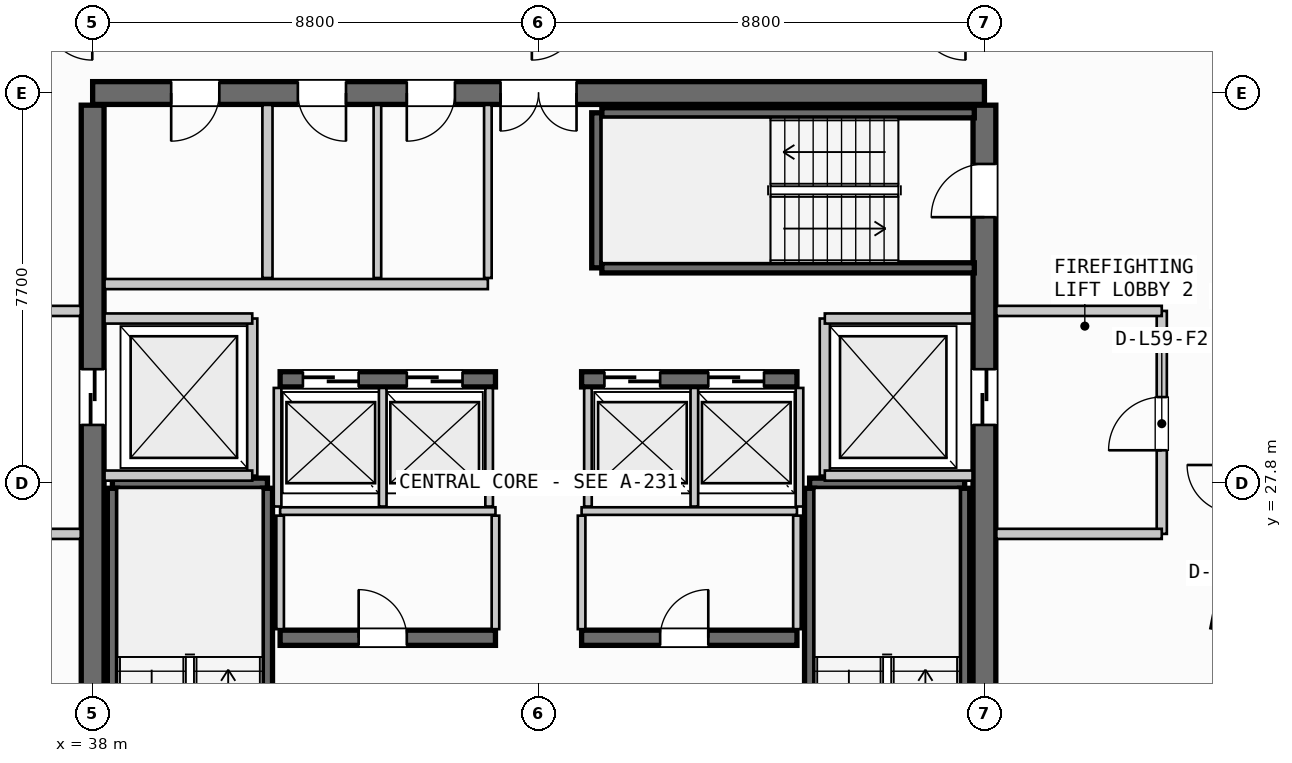
"""IFC4 building model, lengths in metres.
Left out: names, types, materials, properties, quantities, classifications, styles, units other than length and angle.
Written with IfcOpenShell. Run it as: python <this file> out.ifc"""

import sys

from ifc_helpers import new_model, si_unit, direction, frame, frame_2d, origin, origin_2d, place, context, subcontext, project, spatial, rectangle, i_section, extrude, source, transform, mapped, element, fill, save


model = new_model("IFC4")
c1 = context("Model", 3, precision=1e-05, world=origin(), true_north=direction((0.0, 1.0)))
c2 = subcontext(c1, "Body", "Model", "MODEL_VIEW")
j1 = project(units=[si_unit("LENGTHUNIT", "METRE"), si_unit("PLANEANGLEUNIT", "RADIAN")], contexts=[c1])
p1 = place(None, origin())
s1 = spatial("IfcSite", under=j1, at=p1, CompositionType="ELEMENT")
p2 = place(p1, origin())
s2 = spatial("IfcBuilding", under=s1, at=p2, CompositionType="ELEMENT")
p3 = place(p2, frame((0.0, 0.0, 228.4)))
s3 = spatial("IfcBuildingStorey", under=s2, at=p3, CompositionType="ELEMENT", Elevation=228.4)
p4 = place(p3, frame((55.6, 35.5, 0.0), z_axis=(0.0, 0.0, 1.0), x_axis=(-1.0, 0.0, 0.0)))
e1 = element("IfcWall", 1, at=p4, inside=s3, PredefinedType="SHEAR", context=c2, shape_type="SweptSolid", body=[
    extrude(rectangle(XDim=17.6, YDim=0.45, at=frame_2d((8.8, 0.0))), origin(), (0.0, 0.0, 1.0), 3.21),
])
p5 = place(p4, frame((8.05, 0.0, 0.0)))
e2 = element("IfcOpeningElement", 2, at=p5, cuts=e1, PredefinedType="OPENING", context=c2, shape_type="SweptSolid", body=[
    extrude(rectangle(XDim=1.5, YDim=2.2, at=frame_2d((0.75, 1.1))), frame((0.0, 0.235, 0.0), z_axis=(0.0, -1.0, 0.0), x_axis=(1.0, 0.0, 0.0)), (0.0, 0.0, 1.0), 0.47),
])
p6 = place(p4, frame((15.1, 0.0, 0.0)))
e3 = element("IfcOpeningElement", 3, at=p6, cuts=e1, PredefinedType="OPENING", context=c2, shape_type="SweptSolid", body=[
    extrude(rectangle(XDim=0.95, YDim=2.15, at=frame_2d((0.475, 1.075))), frame((0.0, 0.235, 0.0), z_axis=(0.0, -1.0, 0.0), x_axis=(1.0, 0.0, 0.0)), (0.0, 0.0, 1.0), 0.47),
])
p7 = place(p4, frame((12.6, 0.0, 0.0)))
e4 = element("IfcOpeningElement", 4, at=p7, cuts=e1, PredefinedType="OPENING", context=c2, shape_type="SweptSolid", body=[
    extrude(rectangle(XDim=0.95, YDim=2.15, at=frame_2d((0.475, 1.075))), frame((0.0, 0.235, 0.0), z_axis=(0.0, -1.0, 0.0), x_axis=(1.0, 0.0, 0.0)), (0.0, 0.0, 1.0), 0.47),
])
p8 = place(p4, frame((10.45, 0.0, 0.0)))
e5 = element("IfcOpeningElement", 5, at=p8, cuts=e1, PredefinedType="OPENING", context=c2, shape_type="SweptSolid", body=[
    extrude(rectangle(XDim=0.95, YDim=2.15, at=frame_2d((0.475, 1.075))), frame((0.0, 0.235, 0.0), z_axis=(0.0, -1.0, 0.0), x_axis=(1.0, 0.0, 0.0)), (0.0, 0.0, 1.0), 0.47),
])
p9 = place(p3, frame((38.0, 35.26, 0.0), z_axis=(0.0, 0.0, 1.0), x_axis=(0.0, -1.0, 0.0)))
e6 = element("IfcWall", 6, at=p9, inside=s3, PredefinedType="SHEAR", context=c2, shape_type="SweptSolid", body=[
    extrude(rectangle(XDim=14.92, YDim=0.45, at=frame_2d((7.46, 0.0))), origin(), (0.0, 0.0, 1.0), 3.21),
])
p10 = place(p9, frame((5.21, 0.0, 0.0)))
e7 = element("IfcOpeningElement", 7, at=p10, cuts=e6, PredefinedType="OPENING", context=c2, shape_type="SweptSolid", body=[
    extrude(rectangle(XDim=1.1, YDim=2.2, at=frame_2d((0.55, 1.1))), frame((0.0, 0.235, 0.0), z_axis=(0.0, -1.0, 0.0), x_axis=(1.0, 0.0, 0.0)), (0.0, 0.0, 1.0), 0.47),
])
p11 = place(p3, frame((55.6, 20.34, 0.0), z_axis=(0.0, 0.0, 1.0), x_axis=(0.0, 1.0, 0.0)))
e8 = element("IfcWall", 8, at=p11, inside=s3, PredefinedType="SHEAR", context=c2, shape_type="SweptSolid", body=[
    extrude(rectangle(XDim=14.92, YDim=0.45, at=frame_2d((7.46, 0.0))), origin(), (0.0, 0.0, 1.0), 3.21),
])
p12 = place(p11, frame((12.71, 0.0, 0.0)))
e9 = element("IfcOpeningElement", 9, at=p12, cuts=e8, PredefinedType="OPENING", context=c2, shape_type="SweptSolid", body=[
    extrude(rectangle(XDim=1.05, YDim=2.15, at=frame_2d((0.525, 1.075))), frame((0.0, 0.235, 0.0), z_axis=(0.0, -1.0, 0.0), x_axis=(1.0, 0.0, 0.0)), (0.0, 0.0, 1.0), 0.47),
])
p13 = place(p11, frame((8.61, 0.0, 0.0)))
e10 = element("IfcOpeningElement", 10, at=p13, cuts=e8, PredefinedType="OPENING", context=c2, shape_type="SweptSolid", body=[
    extrude(rectangle(XDim=1.1, YDim=2.2, at=frame_2d((0.55, 1.1))), frame((0.0, 0.235, 0.0), z_axis=(0.0, -1.0, 0.0), x_axis=(1.0, 0.0, 0.0)), (0.0, 0.0, 1.0), 0.47),
])
p14 = place(p3, frame((41.7, 24.75, 0.0), z_axis=(0.0, 0.0, 1.0), x_axis=(1.0, 0.0, 0.0)))
e11 = element("IfcWall", 11, at=p14, inside=s3, PredefinedType="SHEAR", context=c2, shape_type="SweptSolid", body=[
    extrude(rectangle(XDim=4.25, YDim=0.3, at=frame_2d((2.125, 0.0))), origin(), (0.0, 0.0, 1.0), 3.21),
])
p15 = place(p14, frame((1.55, 0.0, 0.0)))
e12 = element("IfcOpeningElement", 12, at=p15, cuts=e11, PredefinedType="OPENING", context=c2, shape_type="SweptSolid", body=[
    extrude(rectangle(XDim=0.95, YDim=2.15, at=frame_2d((0.475, 1.075))), frame((0.0, 0.16, 0.0), z_axis=(0.0, -1.0, 0.0), x_axis=(1.0, 0.0, 0.0)), (0.0, 0.0, 1.0), 0.32),
])
p16 = place(p3, frame((47.65, 24.75, 0.0), z_axis=(0.0, 0.0, 1.0), x_axis=(1.0, 0.0, 0.0)))
e13 = element("IfcWall", 13, at=p16, inside=s3, PredefinedType="SHEAR", context=c2, shape_type="SweptSolid", body=[
    extrude(rectangle(XDim=4.25, YDim=0.3, at=frame_2d((2.125, 0.0))), origin(), (0.0, 0.0, 1.0), 3.21),
])
p17 = place(p16, frame((1.55, 0.0, 0.0)))
e14 = element("IfcOpeningElement", 14, at=p17, cuts=e13, PredefinedType="OPENING", context=c2, shape_type="SweptSolid", body=[
    extrude(rectangle(XDim=0.95, YDim=2.15, at=frame_2d((0.475, 1.075))), frame((0.0, 0.16, 0.0), z_axis=(0.0, -1.0, 0.0), x_axis=(1.0, 0.0, 0.0)), (0.0, 0.0, 1.0), 0.32),
])
p18 = place(p3, frame((41.7, 29.85, 0.0), z_axis=(0.0, 0.0, 1.0), x_axis=(1.0, 0.0, 0.0)))
e15 = element("IfcWall", 15, at=p18, inside=s3, PredefinedType="SHEAR", context=c2, shape_type="SweptSolid", body=[
    extrude(rectangle(XDim=4.25, YDim=0.3, at=frame_2d((2.125, 0.0))), origin(), (0.0, 0.0, 1.0), 3.21),
])
p19 = place(p18, frame((0.45, 0.0, 0.0)))
e16 = element("IfcOpeningElement", 16, at=p19, cuts=e15, PredefinedType="OPENING", context=c2, shape_type="SweptSolid", body=[
    extrude(rectangle(XDim=1.1, YDim=2.2, at=frame_2d((0.55, 1.1))), frame((0.0, 0.16, 0.0), z_axis=(0.0, -1.0, 0.0), x_axis=(1.0, 0.0, 0.0)), (0.0, 0.0, 1.0), 0.32),
])
p20 = place(p18, frame((2.5, 0.0, 0.0)))
e17 = element("IfcOpeningElement", 17, at=p20, cuts=e15, PredefinedType="OPENING", context=c2, shape_type="SweptSolid", body=[
    extrude(rectangle(XDim=1.1, YDim=2.2, at=frame_2d((0.55, 1.1))), frame((0.0, 0.16, 0.0), z_axis=(0.0, -1.0, 0.0), x_axis=(1.0, 0.0, 0.0)), (0.0, 0.0, 1.0), 0.32),
])
p21 = place(p3, frame((47.65, 29.85, 0.0), z_axis=(0.0, 0.0, 1.0), x_axis=(1.0, 0.0, 0.0)))
e18 = element("IfcWall", 18, at=p21, inside=s3, PredefinedType="SHEAR", context=c2, shape_type="SweptSolid", body=[
    extrude(rectangle(XDim=4.25, YDim=0.3, at=frame_2d((2.125, 0.0))), origin(), (0.0, 0.0, 1.0), 3.21),
])
p22 = place(p21, frame((0.45, 0.0, 0.0)))
e19 = element("IfcOpeningElement", 19, at=p22, cuts=e18, PredefinedType="OPENING", context=c2, shape_type="SweptSolid", body=[
    extrude(rectangle(XDim=1.1, YDim=2.2, at=frame_2d((0.55, 1.1))), frame((0.0, 0.16, 0.0), z_axis=(0.0, -1.0, 0.0), x_axis=(1.0, 0.0, 0.0)), (0.0, 0.0, 1.0), 0.32),
])
p23 = place(p21, frame((2.5, 0.0, 0.0)))
e20 = element("IfcOpeningElement", 20, at=p23, cuts=e18, PredefinedType="OPENING", context=c2, shape_type="SweptSolid", body=[
    extrude(rectangle(XDim=1.1, YDim=2.2, at=frame_2d((0.55, 1.1))), frame((0.0, 0.16, 0.0), z_axis=(0.0, -1.0, 0.0), x_axis=(1.0, 0.0, 0.0)), (0.0, 0.0, 1.0), 0.32),
])
m1 = source(origin(), c2, "Body", "SweptSolid", [
    extrude(i_section(OverallWidth=0.387, OverallDepth=0.316, WebThickness=0.019, FlangeThickness=0.028, FilletRadius=0.015, at=origin_2d()), origin(), (0.0, 0.0, 1.0), 3.21),
])
p24 = place(p3, frame((60.284, 25.118, 0.0), z_axis=(0.0, 0.0, 1.0), x_axis=(0.980785280403, -0.195090322016, 0.0)))
e21 = element("IfcColumn", 21, at=p24, inside=s3, PredefinedType="COLUMN", context=c2, shape_type="MappedRepresentation", body=[
    mapped(m1, transform((0.0, 0.0, 0.0), scale=1.0)),
])
p25 = place(p3, frame((38.39, 27.8, 0.0), z_axis=(0.0, 0.0, 1.0), x_axis=(1.0, 0.0, 0.0)))
e22 = element("IfcWall", 22, at=p25, inside=s3, PredefinedType="SHEAR", context=c2, shape_type="SweptSolid", body=[
    extrude(rectangle(XDim=3.06, YDim=0.2, at=frame_2d((1.53, 0.0))), origin(), (0.0, 0.0, 1.0), 3.21),
])
for number, where, z_axis, x_axis in (
    (23, (41.45, 27.7, 0.0), (0.0, 0.0, 1.0), (0.0, -1.0, 0.0)),
    (24, (38.39, 20.35, 0.0), (0.0, 0.0, 1.0), (0.0, 1.0, 0.0)),
):
    element("IfcWall", number, at=place(p3, frame(where, z_axis=z_axis, x_axis=x_axis)), inside=s3, PredefinedType="SHEAR", context=c2, shape_type="SweptSolid", body=[
        extrude(rectangle(XDim=7.35, YDim=0.2, at=frame_2d((3.675, 0.0))), origin(), (0.0, 0.0, 1.0), 3.21),
    ])
p26 = place(p3, frame((52.15, 27.8, 0.0), z_axis=(0.0, 0.0, 1.0), x_axis=(1.0, 0.0, 0.0)))
e25 = element("IfcWall", 25, at=p26, inside=s3, PredefinedType="SHEAR", context=c2, shape_type="SweptSolid", body=[
    extrude(rectangle(XDim=3.06, YDim=0.2, at=frame_2d((1.53, 0.0))), origin(), (0.0, 0.0, 1.0), 3.21),
])
for number, where, z_axis, x_axis in (
    (26, (55.21, 27.7, 0.0), (0.0, 0.0, 1.0), (0.0, -1.0, 0.0)),
    (27, (52.15, 20.35, 0.0), (0.0, 0.0, 1.0), (0.0, 1.0, 0.0)),
):
    element("IfcWall", number, at=place(p3, frame(where, z_axis=z_axis, x_axis=x_axis)), inside=s3, PredefinedType="SHEAR", context=c2, shape_type="SweptSolid", body=[
        extrude(rectangle(XDim=7.35, YDim=0.2, at=frame_2d((3.675, 0.0))), origin(), (0.0, 0.0, 1.0), 3.21),
    ])
p27 = place(p3, frame((47.95, 32.05, 0.0), z_axis=(0.0, 0.0, 1.0), x_axis=(0.0, 1.0, 0.0)))
e28 = element("IfcWall", 28, at=p27, inside=s3, PredefinedType="SHEAR", context=c2, shape_type="SweptSolid", body=[
    extrude(rectangle(XDim=3.06, YDim=0.2, at=frame_2d((1.53, 0.0))), origin(), (0.0, 0.0, 1.0), 3.21),
])
for number, where, z_axis, x_axis in (
    (29, (48.05, 35.11, 0.0), (0.0, 0.0, 1.0), (1.0, 0.0, 0.0)),
    (30, (55.4, 32.05, 0.0), (0.0, 0.0, 1.0), (-1.0, 0.0, 0.0)),
):
    element("IfcWall", number, at=place(p3, frame(where, z_axis=z_axis, x_axis=x_axis)), inside=s3, PredefinedType="SHEAR", context=c2, shape_type="SweptSolid", body=[
        extrude(rectangle(XDim=7.35, YDim=0.2, at=frame_2d((3.675, 0.0))), origin(), (0.0, 0.0, 1.0), 3.21),
    ])
p28 = place(p3, frame((41.15, 27.95, 0.0), z_axis=(0.0, 0.0, 1.0), x_axis=(0.0, 1.0, 0.0)))
e31 = element("IfcWall", 31, at=p28, inside=s3, PredefinedType="PARTITIONING", context=c2, shape_type="SweptSolid", body=[
    extrude(rectangle(XDim=3.1, YDim=0.2, at=frame_2d((1.55, 0.0))), origin(), (0.0, 0.0, 1.0), 2.28),
])
for number, where, z_axis, x_axis in (
    (32, (38.235, 27.95, 0.0), (0.0, 0.0, 1.0), (1.0, 0.0, 0.0)),
    (33, (38.235, 31.05, 0.0), (0.0, 0.0, 1.0), (1.0, 0.0, 0.0)),
):
    element("IfcWall", number, at=place(p3, frame(where, z_axis=z_axis, x_axis=x_axis)), inside=s3, PredefinedType="PARTITIONING", context=c2, shape_type="SweptSolid", body=[
        extrude(rectangle(XDim=2.915, YDim=0.2, at=frame_2d((1.458, 0.0))), origin(), (0.0, 0.0, 1.0), 2.28),
    ])
for number, where, z_axis, x_axis in (
    (34, (34.5, 26.8, 0.0), (0.0, 0.0, 1.0), (1.0, 0.0, 0.0)),
    (35, (34.5, 31.2, 0.0), (0.0, 0.0, 1.0), (1.0, 0.0, 0.0)),
):
    element("IfcWall", number, at=place(p3, frame(where, z_axis=z_axis, x_axis=x_axis)), inside=s3, PredefinedType="PARTITIONING", context=c2, shape_type="SweptSolid", body=[
        extrude(rectangle(XDim=3.265, YDim=0.2, at=frame_2d((1.632, 0.0))), origin(), (0.0, 0.0, 1.0), 2.28),
    ])
p29 = place(p3, frame((52.45, 27.95, 0.0), z_axis=(0.0, 0.0, 1.0), x_axis=(0.0, 1.0, 0.0)))
e36 = element("IfcWall", 36, at=p29, inside=s3, PredefinedType="PARTITIONING", context=c2, shape_type="SweptSolid", body=[
    extrude(rectangle(XDim=3.1, YDim=0.2, at=frame_2d((1.55, 0.0))), origin(), (0.0, 0.0, 1.0), 2.28),
])
for number, where, z_axis, x_axis in (
    (37, (52.45, 27.95, 0.0), (0.0, 0.0, 1.0), (1.0, 0.0, 0.0)),
    (38, (52.45, 31.05, 0.0), (0.0, 0.0, 1.0), (1.0, 0.0, 0.0)),
):
    element("IfcWall", number, at=place(p3, frame(where, z_axis=z_axis, x_axis=x_axis)), inside=s3, PredefinedType="PARTITIONING", context=c2, shape_type="SweptSolid", body=[
        extrude(rectangle(XDim=2.915, YDim=0.2, at=frame_2d((1.458, 0.0))), origin(), (0.0, 0.0, 1.0), 2.28),
    ])
p30 = place(p3, frame((59.1, 26.8, 0.0), z_axis=(0.0, 0.0, 1.0), x_axis=(0.0, 1.0, 0.0)))
e39 = element("IfcWall", 39, at=p30, inside=s3, PredefinedType="PARTITIONING", context=c2, shape_type="SweptSolid", body=[
    extrude(rectangle(XDim=4.4, YDim=0.2, at=frame_2d((2.2, 0.0))), origin(), (0.0, 0.0, 1.0), 2.28),
])
p31 = place(p30, frame((1.65, 0.0, 0.0)))
e40 = element("IfcOpeningElement", 40, at=p31, cuts=e39, PredefinedType="OPENING", context=c2, shape_type="SweptSolid", body=[
    extrude(rectangle(XDim=1.05, YDim=2.15, at=frame_2d((0.525, 1.075))), frame((0.0, 0.11, 0.0), z_axis=(0.0, -1.0, 0.0), x_axis=(1.0, 0.0, 0.0)), (0.0, 0.0, 1.0), 0.22),
])
for number, where, z_axis, x_axis in (
    (41, (55.835, 26.8, 0.0), (0.0, 0.0, 1.0), (1.0, 0.0, 0.0)),
    (42, (55.835, 31.2, 0.0), (0.0, 0.0, 1.0), (1.0, 0.0, 0.0)),
):
    element("IfcWall", number, at=place(p3, frame(where, z_axis=z_axis, x_axis=x_axis)), inside=s3, PredefinedType="PARTITIONING", context=c2, shape_type="SweptSolid", body=[
        extrude(rectangle(XDim=3.265, YDim=0.2, at=frame_2d((1.633, 0.0))), origin(), (0.0, 0.0, 1.0), 2.28),
    ])
for number, where, z_axis, x_axis in (
    (43, (41.7, 27.25, 0.0), (0.0, 0.0, 1.0), (1.0, 0.0, 0.0)),
    (44, (47.65, 27.25, 0.0), (0.0, 0.0, 1.0), (1.0, 0.0, 0.0)),
):
    element("IfcWall", number, at=place(p3, frame(where, z_axis=z_axis, x_axis=x_axis)), inside=s3, PredefinedType="PARTITIONING", context=c2, shape_type="SweptSolid", body=[
        extrude(rectangle(XDim=4.25, YDim=0.15, at=frame_2d((2.125, 0.0))), origin(), (0.0, 0.0, 1.0), 2.28),
    ])
for number, where, z_axis, x_axis in (
    (45, (41.7, 24.92, 0.0), (0.0, 0.0, 1.0), (0.0, 1.0, 0.0)),
    (46, (45.95, 24.92, 0.0), (0.0, 0.0, 1.0), (0.0, 1.0, 0.0)),
    (47, (47.65, 24.92, 0.0), (0.0, 0.0, 1.0), (0.0, 1.0, 0.0)),
    (48, (51.9, 24.92, 0.0), (0.0, 0.0, 1.0), (0.0, 1.0, 0.0)),
):
    element("IfcWall", number, at=place(p3, frame(where, z_axis=z_axis, x_axis=x_axis)), inside=s3, PredefinedType="PARTITIONING", context=c2, shape_type="SweptSolid", body=[
        extrude(rectangle(XDim=2.24, YDim=0.15, at=frame_2d((1.12, 0.0))), origin(), (0.0, 0.0, 1.0), 2.28),
    ])
for number, where, z_axis, x_axis in (
    (49, (41.65, 27.34, 0.0), (0.0, 0.0, 1.0), (0.0, 1.0, 0.0)),
    (50, (43.725, 27.34, 0.0), (0.0, 0.0, 1.0), (0.0, 1.0, 0.0)),
    (51, (45.825, 27.34, 0.0), (0.0, 0.0, 1.0), (0.0, 1.0, 0.0)),
    (52, (47.775, 27.34, 0.0), (0.0, 0.0, 1.0), (0.0, 1.0, 0.0)),
    (53, (49.875, 27.34, 0.0), (0.0, 0.0, 1.0), (0.0, 1.0, 0.0)),
    (54, (51.95, 27.34, 0.0), (0.0, 0.0, 1.0), (0.0, 1.0, 0.0)),
):
    element("IfcWall", number, at=place(p3, frame(where, z_axis=z_axis, x_axis=x_axis)), inside=s3, PredefinedType="PARTITIONING", context=c2, shape_type="SweptSolid", body=[
        extrude(rectangle(XDim=2.34, YDim=0.15, at=frame_2d((1.17, 0.0))), origin(), (0.0, 0.0, 1.0), 2.28),
    ])
p32 = place(p3, frame((41.45, 31.85, 0.0), z_axis=(0.0, 0.0, 1.0), x_axis=(0.0, 1.0, 0.0)))
e55 = element("IfcWall", 55, at=p32, inside=s3, PredefinedType="PARTITIONING", context=c2, shape_type="SweptSolid", body=[
    extrude(rectangle(XDim=3.415, YDim=0.2, at=frame_2d((1.708, 0.0))), origin(), (0.0, 0.0, 1.0), 2.28),
])
p33 = place(p3, frame((38.235, 31.73, 0.0), z_axis=(0.0, 0.0, 1.0), x_axis=(1.0, 0.0, 0.0)))
e56 = element("IfcWall", 56, at=p33, inside=s3, PredefinedType="PARTITIONING", context=c2, shape_type="SweptSolid", body=[
    extrude(rectangle(XDim=7.565, YDim=0.2, at=frame_2d((3.782, 0.0))), origin(), (0.0, 0.0, 1.0), 2.28),
])
p34 = place(p3, frame((45.8, 31.85, 0.0), z_axis=(0.0, 0.0, 1.0), x_axis=(0.0, 1.0, 0.0)))
e57 = element("IfcWall", 57, at=p34, inside=s3, PredefinedType="PARTITIONING", context=c2, shape_type="SweptSolid", body=[
    extrude(rectangle(XDim=3.415, YDim=0.15, at=frame_2d((1.708, 0.0))), origin(), (0.0, 0.0, 1.0), 2.28),
])
p35 = place(p3, frame((43.62, 31.85, 0.0), z_axis=(0.0, 0.0, 1.0), x_axis=(0.0, 1.0, 0.0)))
e58 = element("IfcWall", 58, at=p35, inside=s3, PredefinedType="PLUMBINGWALL", context=c2, shape_type="SweptSolid", body=[
    extrude(rectangle(XDim=3.415, YDim=0.15, at=frame_2d((1.708, 0.0))), origin(), (0.0, 0.0, 1.0), 2.28),
])
m2 = source(origin(), c2, "Body", "SweptSolid", [
    extrude(rectangle(XDim=1.05, YDim=2.15, at=frame_2d((0.525, 1.075))), frame((0.0, 0.025, 0.0), z_axis=(0.0, -1.0, 0.0), x_axis=(1.0, 0.0, 0.0)), (0.0, 0.0, 1.0), 0.05),
])
p36 = place(p12, origin())
e59 = element("IfcDoor", 59, at=p36, inside=s3, OperationType="SINGLE_SWING_LEFT", PredefinedType="DOOR", context=c2, shape_type="MappedRepresentation", body=[
    mapped(m2, transform((0.0, 0.0, 0.0), scale=1.0)),
])
fill(e9, e59)
m3 = source(origin(), c2, "Body", "SweptSolid", [
    extrude(rectangle(XDim=1.5, YDim=2.2, at=frame_2d((0.75, 1.1))), frame((0.0, 0.025, 0.0), z_axis=(0.0, -1.0, 0.0), x_axis=(1.0, 0.0, 0.0)), (0.0, 0.0, 1.0), 0.05),
])
p37 = place(p5, origin())
e60 = element("IfcDoor", 60, at=p37, inside=s3, OperationType="DOUBLE_DOOR_SINGLE_SWING", PredefinedType="DOOR", context=c2, shape_type="MappedRepresentation", body=[
    mapped(m3, transform((0.0, 0.0, 0.0), scale=1.0)),
])
fill(e2, e60)
m4 = source(origin(), c2, "Body", "SweptSolid", [
    extrude(rectangle(XDim=1.1, YDim=2.2, at=frame_2d((0.55, 1.1))), frame((0.0, 0.025, 0.0), z_axis=(0.0, -1.0, 0.0), x_axis=(1.0, 0.0, 0.0)), (0.0, 0.0, 1.0), 0.05),
])
p38 = place(p10, origin())
e61 = element("IfcDoor", 61, at=p38, inside=s3, OperationType="SLIDING_TO_LEFT", PredefinedType="DOOR", context=c2, shape_type="MappedRepresentation", body=[
    mapped(m4, transform((0.0, 0.0, 0.0), scale=1.0)),
])
fill(e7, e61)
p39 = place(p13, origin())
e62 = element("IfcDoor", 62, at=p39, inside=s3, OperationType="SLIDING_TO_RIGHT", PredefinedType="DOOR", context=c2, shape_type="MappedRepresentation", body=[
    mapped(m4, transform((0.0, 0.0, 0.0), scale=1.0)),
])
fill(e10, e62)
m5 = source(origin(), c2, "Body", "SweptSolid", [
    extrude(rectangle(XDim=0.95, YDim=2.15, at=frame_2d((0.475, 1.075))), frame((0.0, 0.025, 0.0), z_axis=(0.0, -1.0, 0.0), x_axis=(1.0, 0.0, 0.0)), (0.0, 0.0, 1.0), 0.05),
])
p40 = place(p15, origin())
e63 = element("IfcDoor", 63, at=p40, inside=s3, OperationType="SINGLE_SWING_LEFT", PredefinedType="DOOR", context=c2, shape_type="MappedRepresentation", body=[
    mapped(m5, transform((0.0, 0.0, 0.0), scale=1.0)),
])
fill(e12, e63)
p41 = place(p17, origin())
e64 = element("IfcDoor", 64, at=p41, inside=s3, OperationType="SINGLE_SWING_RIGHT", PredefinedType="DOOR", context=c2, shape_type="MappedRepresentation", body=[
    mapped(m5, transform((0.0, 0.0, 0.0), scale=1.0)),
])
fill(e14, e64)
p42 = place(p19, origin())
e65 = element("IfcDoor", 65, at=p42, inside=s3, OperationType="SLIDING_TO_LEFT", PredefinedType="DOOR", context=c2, shape_type="MappedRepresentation", body=[
    mapped(m4, transform((0.0, 0.0, 0.0), scale=1.0)),
])
fill(e16, e65)
p43 = place(p20, origin())
e66 = element("IfcDoor", 66, at=p43, inside=s3, OperationType="SLIDING_TO_LEFT", PredefinedType="DOOR", context=c2, shape_type="MappedRepresentation", body=[
    mapped(m4, transform((0.0, 0.0, 0.0), scale=1.0)),
])
fill(e17, e66)
p44 = place(p22, origin())
e67 = element("IfcDoor", 67, at=p44, inside=s3, OperationType="SLIDING_TO_LEFT", PredefinedType="DOOR", context=c2, shape_type="MappedRepresentation", body=[
    mapped(m4, transform((0.0, 0.0, 0.0), scale=1.0)),
])
fill(e19, e67)
p45 = place(p23, origin())
e68 = element("IfcDoor", 68, at=p45, inside=s3, OperationType="SLIDING_TO_LEFT", PredefinedType="DOOR", context=c2, shape_type="MappedRepresentation", body=[
    mapped(m4, transform((0.0, 0.0, 0.0), scale=1.0)),
])
fill(e20, e68)
p46 = place(p6, origin())
e69 = element("IfcDoor", 69, at=p46, inside=s3, OperationType="SINGLE_SWING_RIGHT", PredefinedType="DOOR", context=c2, shape_type="MappedRepresentation", body=[
    mapped(m5, transform((0.0, 0.0, 0.0), scale=1.0)),
])
fill(e3, e69)
p47 = place(p7, origin())
e70 = element("IfcDoor", 70, at=p47, inside=s3, OperationType="SINGLE_SWING_LEFT", PredefinedType="DOOR", context=c2, shape_type="MappedRepresentation", body=[
    mapped(m5, transform((0.0, 0.0, 0.0), scale=1.0)),
])
fill(e4, e70)
p48 = place(p8, origin())
e71 = element("IfcDoor", 71, at=p48, inside=s3, OperationType="SINGLE_SWING_RIGHT", PredefinedType="DOOR", context=c2, shape_type="MappedRepresentation", body=[
    mapped(m5, transform((0.0, 0.0, 0.0), scale=1.0)),
])
fill(e5, e71)
p49 = place(p31, origin())
e72 = element("IfcDoor", 72, at=p49, inside=s3, OperationType="SINGLE_SWING_LEFT", PredefinedType="DOOR", context=c2, shape_type="MappedRepresentation", body=[
    mapped(m2, transform((0.0, 0.0, 0.0), scale=1.0)),
])
fill(e40, e72)
save(model, sys.argv[1])
